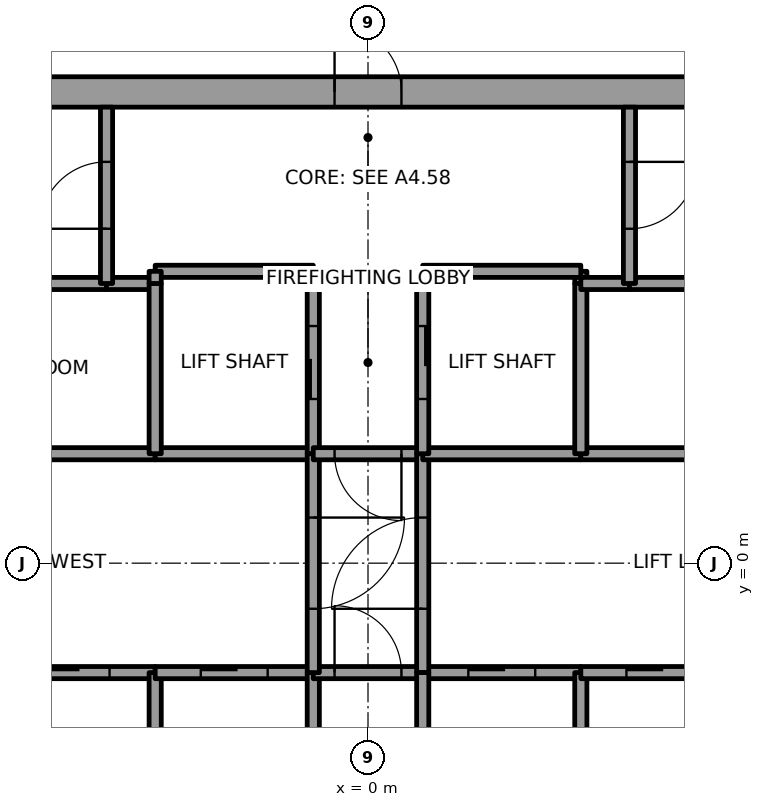
"""IFC4 building model, lengths in metres.
Left out: names, types, materials, properties, quantities, classifications, styles, units other than length and angle.
Written with IfcOpenShell. Run it as: python <this file> out.ifc"""

import sys

from ifc_helpers import new_model, si_unit, direction, frame, frame_2d, origin, place, context, subcontext, project, spatial, rectangle, extrude, element, fill, save


model = new_model("IFC4")
c1 = context("Model", 3, precision=1e-05, world=origin(), true_north=direction((0.0, 1.0)))
c2 = subcontext(c1, "Body", "Model", "MODEL_VIEW")
j1 = project(units=[si_unit("LENGTHUNIT", "METRE"), si_unit("PLANEANGLEUNIT", "RADIAN")], contexts=[c1])
p1 = place(None, origin())
s1 = spatial("IfcSite", under=j1, at=p1, CompositionType="ELEMENT")
p2 = place(p1, origin())
s2 = spatial("IfcBuilding", under=s1, at=p2, CompositionType="ELEMENT")
p3 = place(p2, frame((0.0, 0.0, 251.0)))
s3 = spatial("IfcBuildingStorey", under=s2, at=p3, CompositionType="ELEMENT", Elevation=251.0)
p4 = place(p3, frame((-11.0, 7.75, 0.0), z_axis=(0.0, 0.0, 1.0), x_axis=(1.0, 0.0, 0.0)))
e1 = element("IfcWall", 1, at=p4, inside=s3, PredefinedType="SHEAR", context=c2, shape_type="SweptSolid", body=[
    extrude(rectangle(XDim=22.0, YDim=0.5, at=frame_2d((11.0, 0.0))), origin(), (0.0, 0.0, 1.0), 4.0),
])
p5 = place(p4, frame((10.45, 0.0, 0.0)))
e2 = element("IfcOpeningElement", 2, at=p5, cuts=e1, PredefinedType="OPENING", context=c2, shape_type="SweptSolid", body=[
    extrude(rectangle(XDim=1.1, YDim=2.1, at=frame_2d((0.55, 1.05))), frame((0.0, 0.25, 0.0), z_axis=(0.0, -1.0, 0.0), x_axis=(1.0, 0.0, 0.0)), (0.0, 0.0, 1.0), 0.5),
])
p6 = place(p3, frame((-8.7, 1.8, 0.0), z_axis=(0.0, 0.0, 1.0), x_axis=(1.0, 0.0, 0.0)))
e3 = element("IfcWall", 3, at=p6, inside=s3, PredefinedType="SOLIDWALL", context=c2, shape_type="SweptSolid", body=[
    extrude(rectangle(XDim=5.2, YDim=0.2, at=frame_2d((2.6, 0.0))), origin(), (0.0, 0.0, 1.0), 3.85),
])
p7 = place(p6, frame((2.15, 0.0, 0.0)))
e4 = element("IfcOpeningElement", 4, at=p7, cuts=e3, PredefinedType="OPENING", context=c2, shape_type="SweptSolid", body=[
    extrude(rectangle(XDim=0.9, YDim=2.1, at=frame_2d((0.45, 1.05))), frame((0.0, 0.1, 0.0), z_axis=(0.0, -1.0, 0.0), x_axis=(1.0, 0.0, 0.0)), (0.0, 0.0, 1.0), 0.2),
])
p8 = place(p3, frame((-4.3, 4.6, 0.0), z_axis=(0.0, 0.0, 1.0), x_axis=(-1.0, 0.0, 0.0)))
e5 = element("IfcWall", 5, at=p8, inside=s3, PredefinedType="SOLIDWALL", context=c2, shape_type="SweptSolid", body=[
    extrude(rectangle(XDim=4.4, YDim=0.2, at=frame_2d((2.2, 0.0))), origin(), (0.0, 0.0, 1.0), 3.85),
])
p9 = place(p3, frame((-6.1, -1.8, 0.0), z_axis=(0.0, 0.0, 1.0), x_axis=(1.0, 0.0, 0.0)))
e6 = element("IfcWall", 6, at=p9, inside=s3, PredefinedType="SOLIDWALL", context=c2, shape_type="SweptSolid", body=[
    extrude(rectangle(XDim=2.6, YDim=0.2, at=frame_2d((1.3, 0.0))), origin(), (0.0, 0.0, 1.0), 3.85),
])
p10 = place(p9, frame((0.75, 0.0, 0.0)))
e7 = element("IfcOpeningElement", 7, at=p10, cuts=e6, PredefinedType="OPENING", context=c2, shape_type="SweptSolid", body=[
    extrude(rectangle(XDim=1.1, YDim=2.1, at=frame_2d((0.55, 1.05))), frame((0.0, 0.1, 0.0), z_axis=(0.0, -1.0, 0.0), x_axis=(1.0, 0.0, 0.0)), (0.0, 0.0, 1.0), 0.2),
])
p11 = place(p3, frame((-3.5, 4.6, 0.0), z_axis=(0.0, 0.0, 1.0), x_axis=(-1.0, 0.0, 0.0)))
e8 = element("IfcWall", 8, at=p11, inside=s3, PredefinedType="SOLIDWALL", context=c2, shape_type="SweptSolid", body=[
    extrude(rectangle(XDim=0.8, YDim=0.2, at=frame_2d((0.4, 0.0))), origin(), (0.0, 0.0, 1.0), 3.85),
])
p12 = place(p3, frame((-4.3, 4.6, 0.0), z_axis=(0.0, 0.0, 1.0), x_axis=(0.0, 1.0, 0.0)))
e9 = element("IfcWall", 9, at=p12, inside=s3, PredefinedType="SOLIDWALL", context=c2, shape_type="SweptSolid", body=[
    extrude(rectangle(XDim=2.9, YDim=0.2, at=frame_2d((1.45, 0.0))), origin(), (0.0, 0.0, 1.0), 3.85),
])
p13 = place(p12, frame((0.9, 0.0, 0.0)))
e10 = element("IfcOpeningElement", 10, at=p13, cuts=e9, PredefinedType="OPENING", context=c2, shape_type="SweptSolid", body=[
    extrude(rectangle(XDim=1.1, YDim=2.1, at=frame_2d((0.55, 1.05))), frame((0.0, 0.1, 0.0), z_axis=(0.0, -1.0, 0.0), x_axis=(1.0, 0.0, 0.0)), (0.0, 0.0, 1.0), 0.2),
])
p14 = place(p3, frame((-3.5, -4.6, 0.0), z_axis=(0.0, 0.0, 1.0), x_axis=(0.0, 1.0, 0.0)))
e11 = element("IfcWall", 11, at=p14, inside=s3, PredefinedType="SOLIDWALL", context=c2, shape_type="SweptSolid", body=[
    extrude(rectangle(XDim=2.8, YDim=0.2, at=frame_2d((1.4, 0.0))), origin(), (0.0, 0.0, 1.0), 3.85),
])
p15 = place(p3, frame((-3.5, -1.8, 0.0), z_axis=(0.0, 0.0, 1.0), x_axis=(1.0, 0.0, 0.0)))
e12 = element("IfcWall", 12, at=p15, inside=s3, PredefinedType="SOLIDWALL", context=c2, shape_type="SweptSolid", body=[
    extrude(rectangle(XDim=2.6, YDim=0.2, at=frame_2d((1.3, 0.0))), origin(), (0.0, 0.0, 1.0), 3.85),
])
p16 = place(p15, frame((0.75, 0.0, 0.0)))
e13 = element("IfcOpeningElement", 13, at=p16, cuts=e12, PredefinedType="OPENING", context=c2, shape_type="SweptSolid", body=[
    extrude(rectangle(XDim=1.1, YDim=2.1, at=frame_2d((0.55, 1.05))), frame((0.0, 0.1, 0.0), z_axis=(0.0, -1.0, 0.0), x_axis=(1.0, 0.0, 0.0)), (0.0, 0.0, 1.0), 0.2),
])
p17 = place(p3, frame((-0.9, 1.8, 0.0), z_axis=(0.0, 0.0, 1.0), x_axis=(-1.0, 0.0, 0.0)))
e14 = element("IfcWall", 14, at=p17, inside=s3, PredefinedType="SOLIDWALL", context=c2, shape_type="SweptSolid", body=[
    extrude(rectangle(XDim=2.6, YDim=0.2, at=frame_2d((1.3, 0.0))), origin(), (0.0, 0.0, 1.0), 3.85),
])
p18 = place(p3, frame((-3.5, 1.8, 0.0), z_axis=(0.0, 0.0, 1.0), x_axis=(0.0, 1.0, 0.0)))
e15 = element("IfcWall", 15, at=p18, inside=s3, PredefinedType="SOLIDWALL", context=c2, shape_type="SweptSolid", body=[
    extrude(rectangle(XDim=2.8, YDim=0.2, at=frame_2d((1.4, 0.0))), origin(), (0.0, 0.0, 1.0), 3.85),
])
p19 = place(p3, frame((-0.9, 1.8, 0.0), z_axis=(0.0, 0.0, 1.0), x_axis=(0.0, 1.0, 0.0)))
e16 = element("IfcWall", 16, at=p19, inside=s3, PredefinedType="SOLIDWALL", context=c2, shape_type="SweptSolid", body=[
    extrude(rectangle(XDim=3.0, YDim=0.2, at=frame_2d((1.5, 0.0))), origin(), (0.0, 0.0, 1.0), 3.85),
])
p20 = place(p19, frame((0.9, 0.0, 0.0)))
e17 = element("IfcOpeningElement", 17, at=p20, cuts=e16, PredefinedType="OPENING", context=c2, shape_type="SweptSolid", body=[
    extrude(rectangle(XDim=1.2, YDim=2.1, at=frame_2d((0.6, 1.05))), frame((0.0, 0.1, 0.0), z_axis=(0.0, -1.0, 0.0), x_axis=(1.0, 0.0, 0.0)), (0.0, 0.0, 1.0), 0.2),
])
p21 = place(p3, frame((-0.9, 4.8, 0.0), z_axis=(0.0, 0.0, 1.0), x_axis=(-1.0, 0.0, 0.0)))
e18 = element("IfcWall", 18, at=p21, inside=s3, PredefinedType="SOLIDWALL", context=c2, shape_type="SweptSolid", body=[
    extrude(rectangle(XDim=2.6, YDim=0.2, at=frame_2d((1.3, 0.0))), origin(), (0.0, 0.0, 1.0), 3.85),
])
p22 = place(p3, frame((-3.5, 4.8, 0.0), z_axis=(0.0, 0.0, 1.0), x_axis=(0.0, -1.0, 0.0)))
e19 = element("IfcWall", 19, at=p22, inside=s3, PredefinedType="SOLIDWALL", context=c2, shape_type="SweptSolid", body=[
    extrude(rectangle(XDim=0.2, YDim=0.2, at=frame_2d((0.1, 0.0))), origin(), (0.0, 0.0, 1.0), 3.85),
])
p23 = place(p3, frame((-0.9, -4.6, 0.0), z_axis=(0.0, 0.0, 1.0), x_axis=(0.0, 1.0, 0.0)))
e20 = element("IfcWall", 20, at=p23, inside=s3, PredefinedType="SOLIDWALL", context=c2, shape_type="SweptSolid", body=[
    extrude(rectangle(XDim=2.8, YDim=0.2, at=frame_2d((1.4, 0.0))), origin(), (0.0, 0.0, 1.0), 3.85),
])
p24 = place(p3, frame((-0.9, -1.8, 0.0), z_axis=(0.0, 0.0, 1.0), x_axis=(1.0, 0.0, 0.0)))
e21 = element("IfcWall", 21, at=p24, inside=s3, PredefinedType="SOLIDWALL", context=c2, shape_type="SweptSolid", body=[
    extrude(rectangle(XDim=1.8, YDim=0.2, at=frame_2d((0.9, 0.0))), origin(), (0.0, 0.0, 1.0), 3.85),
])
p25 = place(p24, frame((0.35, 0.0, 0.0)))
e22 = element("IfcOpeningElement", 22, at=p25, cuts=e21, PredefinedType="OPENING", context=c2, shape_type="SweptSolid", body=[
    extrude(rectangle(XDim=1.1, YDim=2.1, at=frame_2d((0.55, 1.05))), frame((0.0, 0.1, 0.0), z_axis=(0.0, -1.0, 0.0), x_axis=(1.0, 0.0, 0.0)), (0.0, 0.0, 1.0), 0.2),
])
p26 = place(p3, frame((-0.9, 1.8, 0.0), z_axis=(0.0, 0.0, 1.0), x_axis=(0.0, -1.0, 0.0)))
e23 = element("IfcWall", 23, at=p26, inside=s3, PredefinedType="SOLIDWALL", context=c2, shape_type="SweptSolid", body=[
    extrude(rectangle(XDim=3.6, YDim=0.2, at=frame_2d((1.8, 0.0))), origin(), (0.0, 0.0, 1.0), 3.85),
])
p27 = place(p26, frame((1.05, 0.0, 0.0)))
e24 = element("IfcOpeningElement", 24, at=p27, cuts=e23, PredefinedType="OPENING", context=c2, shape_type="SweptSolid", body=[
    extrude(rectangle(XDim=1.5, YDim=2.1, at=frame_2d((0.75, 1.05))), frame((0.0, 0.1, 0.0), z_axis=(0.0, -1.0, 0.0), x_axis=(1.0, 0.0, 0.0)), (0.0, 0.0, 1.0), 0.2),
])
p28 = place(p3, frame((0.9, 1.8, 0.0), z_axis=(0.0, 0.0, 1.0), x_axis=(-1.0, 0.0, 0.0)))
e25 = element("IfcWall", 25, at=p28, inside=s3, PredefinedType="SOLIDWALL", context=c2, shape_type="SweptSolid", body=[
    extrude(rectangle(XDim=1.8, YDim=0.2, at=frame_2d((0.9, 0.0))), origin(), (0.0, 0.0, 1.0), 3.85),
])
p29 = place(p28, frame((0.35, 0.0, 0.0)))
e26 = element("IfcOpeningElement", 26, at=p29, cuts=e25, PredefinedType="OPENING", context=c2, shape_type="SweptSolid", body=[
    extrude(rectangle(XDim=1.1, YDim=2.1, at=frame_2d((0.55, 1.05))), frame((0.0, 0.1, 0.0), z_axis=(0.0, -1.0, 0.0), x_axis=(1.0, 0.0, 0.0)), (0.0, 0.0, 1.0), 0.2),
])
p30 = place(p3, frame((0.9, -1.8, 0.0), z_axis=(0.0, 0.0, 1.0), x_axis=(1.0, 0.0, 0.0)))
e27 = element("IfcWall", 27, at=p30, inside=s3, PredefinedType="SOLIDWALL", context=c2, shape_type="SweptSolid", body=[
    extrude(rectangle(XDim=2.6, YDim=0.2, at=frame_2d((1.3, 0.0))), origin(), (0.0, 0.0, 1.0), 3.85),
])
p31 = place(p30, frame((0.75, 0.0, 0.0)))
e28 = element("IfcOpeningElement", 28, at=p31, cuts=e27, PredefinedType="OPENING", context=c2, shape_type="SweptSolid", body=[
    extrude(rectangle(XDim=1.1, YDim=2.1, at=frame_2d((0.55, 1.05))), frame((0.0, 0.1, 0.0), z_axis=(0.0, -1.0, 0.0), x_axis=(1.0, 0.0, 0.0)), (0.0, 0.0, 1.0), 0.2),
])
p32 = place(p3, frame((0.9, -1.8, 0.0), z_axis=(0.0, 0.0, 1.0), x_axis=(0.0, 1.0, 0.0)))
e29 = element("IfcWall", 29, at=p32, inside=s3, PredefinedType="SOLIDWALL", context=c2, shape_type="SweptSolid", body=[
    extrude(rectangle(XDim=3.6, YDim=0.2, at=frame_2d((1.8, 0.0))), origin(), (0.0, 0.0, 1.0), 3.85),
])
p33 = place(p32, frame((1.05, 0.0, 0.0)))
e30 = element("IfcOpeningElement", 30, at=p33, cuts=e29, PredefinedType="OPENING", context=c2, shape_type="SweptSolid", body=[
    extrude(rectangle(XDim=1.5, YDim=2.1, at=frame_2d((0.75, 1.05))), frame((0.0, 0.1, 0.0), z_axis=(0.0, -1.0, 0.0), x_axis=(1.0, 0.0, 0.0)), (0.0, 0.0, 1.0), 0.2),
])
p34 = place(p3, frame((0.9, -1.8, 0.0), z_axis=(0.0, 0.0, 1.0), x_axis=(0.0, -1.0, 0.0)))
e31 = element("IfcWall", 31, at=p34, inside=s3, PredefinedType="SOLIDWALL", context=c2, shape_type="SweptSolid", body=[
    extrude(rectangle(XDim=2.8, YDim=0.2, at=frame_2d((1.4, 0.0))), origin(), (0.0, 0.0, 1.0), 3.85),
])
p35 = place(p3, frame((3.5, 1.8, 0.0), z_axis=(0.0, 0.0, 1.0), x_axis=(-1.0, 0.0, 0.0)))
e32 = element("IfcWall", 32, at=p35, inside=s3, PredefinedType="SOLIDWALL", context=c2, shape_type="SweptSolid", body=[
    extrude(rectangle(XDim=2.6, YDim=0.2, at=frame_2d((1.3, 0.0))), origin(), (0.0, 0.0, 1.0), 3.85),
])
p36 = place(p3, frame((3.5, 4.6, 0.0), z_axis=(0.0, 0.0, 1.0), x_axis=(0.0, 1.0, 0.0)))
e33 = element("IfcWall", 33, at=p36, inside=s3, PredefinedType="SOLIDWALL", context=c2, shape_type="SweptSolid", body=[
    extrude(rectangle(XDim=0.2, YDim=0.2, at=frame_2d((0.1, 0.0))), origin(), (0.0, 0.0, 1.0), 3.85),
])
p37 = place(p3, frame((3.5, 4.8, 0.0), z_axis=(0.0, 0.0, 1.0), x_axis=(-1.0, 0.0, 0.0)))
e34 = element("IfcWall", 34, at=p37, inside=s3, PredefinedType="SOLIDWALL", context=c2, shape_type="SweptSolid", body=[
    extrude(rectangle(XDim=2.6, YDim=0.2, at=frame_2d((1.3, 0.0))), origin(), (0.0, 0.0, 1.0), 3.85),
])
p38 = place(p3, frame((0.9, 4.8, 0.0), z_axis=(0.0, 0.0, 1.0), x_axis=(0.0, -1.0, 0.0)))
e35 = element("IfcWall", 35, at=p38, inside=s3, PredefinedType="SOLIDWALL", context=c2, shape_type="SweptSolid", body=[
    extrude(rectangle(XDim=3.0, YDim=0.2, at=frame_2d((1.5, 0.0))), origin(), (0.0, 0.0, 1.0), 3.85),
])
p39 = place(p38, frame((0.9, 0.0, 0.0)))
e36 = element("IfcOpeningElement", 36, at=p39, cuts=e35, PredefinedType="OPENING", context=c2, shape_type="SweptSolid", body=[
    extrude(rectangle(XDim=1.2, YDim=2.1, at=frame_2d((0.6, 1.05))), frame((0.0, 0.1, 0.0), z_axis=(0.0, -1.0, 0.0), x_axis=(1.0, 0.0, 0.0)), (0.0, 0.0, 1.0), 0.2),
])
p40 = place(p3, frame((3.5, -4.6, 0.0), z_axis=(0.0, 0.0, 1.0), x_axis=(0.0, 1.0, 0.0)))
e37 = element("IfcWall", 37, at=p40, inside=s3, PredefinedType="SOLIDWALL", context=c2, shape_type="SweptSolid", body=[
    extrude(rectangle(XDim=2.8, YDim=0.2, at=frame_2d((1.4, 0.0))), origin(), (0.0, 0.0, 1.0), 3.85),
])
p41 = place(p3, frame((3.5, -1.8, 0.0), z_axis=(0.0, 0.0, 1.0), x_axis=(1.0, 0.0, 0.0)))
e38 = element("IfcWall", 38, at=p41, inside=s3, PredefinedType="SOLIDWALL", context=c2, shape_type="SweptSolid", body=[
    extrude(rectangle(XDim=2.6, YDim=0.2, at=frame_2d((1.3, 0.0))), origin(), (0.0, 0.0, 1.0), 3.85),
])
p42 = place(p41, frame((0.75, 0.0, 0.0)))
e39 = element("IfcOpeningElement", 39, at=p42, cuts=e38, PredefinedType="OPENING", context=c2, shape_type="SweptSolid", body=[
    extrude(rectangle(XDim=1.1, YDim=2.1, at=frame_2d((0.55, 1.05))), frame((0.0, 0.1, 0.0), z_axis=(0.0, -1.0, 0.0), x_axis=(1.0, 0.0, 0.0)), (0.0, 0.0, 1.0), 0.2),
])
p43 = place(p3, frame((3.5, 1.8, 0.0), z_axis=(0.0, 0.0, 1.0), x_axis=(1.0, 0.0, 0.0)))
e40 = element("IfcWall", 40, at=p43, inside=s3, PredefinedType="SOLIDWALL", context=c2, shape_type="SweptSolid", body=[
    extrude(rectangle(XDim=5.2, YDim=0.2, at=frame_2d((2.6, 0.0))), origin(), (0.0, 0.0, 1.0), 3.85),
])
p44 = place(p43, frame((2.15, 0.0, 0.0)))
e41 = element("IfcOpeningElement", 41, at=p44, cuts=e40, PredefinedType="OPENING", context=c2, shape_type="SweptSolid", body=[
    extrude(rectangle(XDim=0.9, YDim=2.1, at=frame_2d((0.45, 1.05))), frame((0.0, 0.1, 0.0), z_axis=(0.0, -1.0, 0.0), x_axis=(1.0, 0.0, 0.0)), (0.0, 0.0, 1.0), 0.2),
])
p45 = place(p3, frame((3.5, 4.6, 0.0), z_axis=(0.0, 0.0, 1.0), x_axis=(0.0, -1.0, 0.0)))
e42 = element("IfcWall", 42, at=p45, inside=s3, PredefinedType="SOLIDWALL", context=c2, shape_type="SweptSolid", body=[
    extrude(rectangle(XDim=2.8, YDim=0.2, at=frame_2d((1.4, 0.0))), origin(), (0.0, 0.0, 1.0), 3.85),
])
p46 = place(p3, frame((4.3, 4.6, 0.0), z_axis=(0.0, 0.0, 1.0), x_axis=(-1.0, 0.0, 0.0)))
e43 = element("IfcWall", 43, at=p46, inside=s3, PredefinedType="SOLIDWALL", context=c2, shape_type="SweptSolid", body=[
    extrude(rectangle(XDim=0.8, YDim=0.2, at=frame_2d((0.4, 0.0))), origin(), (0.0, 0.0, 1.0), 3.85),
])
p47 = place(p3, frame((8.7, 4.6, 0.0), z_axis=(0.0, 0.0, 1.0), x_axis=(-1.0, 0.0, 0.0)))
e44 = element("IfcWall", 44, at=p47, inside=s3, PredefinedType="SOLIDWALL", context=c2, shape_type="SweptSolid", body=[
    extrude(rectangle(XDim=4.4, YDim=0.2, at=frame_2d((2.2, 0.0))), origin(), (0.0, 0.0, 1.0), 3.85),
])
p48 = place(p3, frame((4.3, 7.5, 0.0), z_axis=(0.0, 0.0, 1.0), x_axis=(0.0, -1.0, 0.0)))
e45 = element("IfcWall", 45, at=p48, inside=s3, PredefinedType="SOLIDWALL", context=c2, shape_type="SweptSolid", body=[
    extrude(rectangle(XDim=2.9, YDim=0.2, at=frame_2d((1.45, 0.0))), origin(), (0.0, 0.0, 1.0), 3.85),
])
p49 = place(p48, frame((0.9, 0.0, 0.0)))
e46 = element("IfcOpeningElement", 46, at=p49, cuts=e45, PredefinedType="OPENING", context=c2, shape_type="SweptSolid", body=[
    extrude(rectangle(XDim=1.1, YDim=2.1, at=frame_2d((0.55, 1.05))), frame((0.0, 0.1, 0.0), z_axis=(0.0, -1.0, 0.0), x_axis=(1.0, 0.0, 0.0)), (0.0, 0.0, 1.0), 0.2),
])
p50 = place(p10, origin())
e47 = element("IfcDoor", 47, at=p50, inside=s3, OperationType="SLIDING_TO_LEFT", PredefinedType="DOOR", context=c2, shape_type="SweptSolid", body=[
    extrude(rectangle(XDim=1.1, YDim=2.1, at=frame_2d((0.55, 1.05))), frame((0.0, 0.025, 0.0), z_axis=(0.0, -1.0, 0.0), x_axis=(1.0, 0.0, 0.0)), (0.0, 0.0, 1.0), 0.05),
])
fill(e7, e47)
p51 = place(p16, origin())
e48 = element("IfcDoor", 48, at=p51, inside=s3, OperationType="SLIDING_TO_LEFT", PredefinedType="DOOR", context=c2, shape_type="SweptSolid", body=[
    extrude(rectangle(XDim=1.1, YDim=2.1, at=frame_2d((0.55, 1.05))), frame((0.0, 0.025, 0.0), z_axis=(0.0, -1.0, 0.0), x_axis=(1.0, 0.0, 0.0)), (0.0, 0.0, 1.0), 0.05),
])
fill(e13, e48)
p52 = place(p31, origin())
e49 = element("IfcDoor", 49, at=p52, inside=s3, OperationType="SLIDING_TO_RIGHT", PredefinedType="DOOR", context=c2, shape_type="SweptSolid", body=[
    extrude(rectangle(XDim=1.1, YDim=2.1, at=frame_2d((0.55, 1.05))), frame((0.0, 0.025, 0.0), z_axis=(0.0, -1.0, 0.0), x_axis=(1.0, 0.0, 0.0)), (0.0, 0.0, 1.0), 0.05),
])
fill(e28, e49)
p53 = place(p42, origin())
e50 = element("IfcDoor", 50, at=p53, inside=s3, OperationType="SLIDING_TO_LEFT", PredefinedType="DOOR", context=c2, shape_type="SweptSolid", body=[
    extrude(rectangle(XDim=1.1, YDim=2.1, at=frame_2d((0.55, 1.05))), frame((0.0, 0.025, 0.0), z_axis=(0.0, -1.0, 0.0), x_axis=(1.0, 0.0, 0.0)), (0.0, 0.0, 1.0), 0.05),
])
fill(e39, e50)
p54 = place(p20, origin())
e51 = element("IfcDoor", 51, at=p54, inside=s3, OperationType="SLIDING_TO_RIGHT", PredefinedType="DOOR", context=c2, shape_type="SweptSolid", body=[
    extrude(rectangle(XDim=1.2, YDim=2.1, at=frame_2d((0.6, 1.05))), frame((0.0, 0.025, 0.0), z_axis=(0.0, -1.0, 0.0), x_axis=(1.0, 0.0, 0.0)), (0.0, 0.0, 1.0), 0.05),
])
fill(e17, e51)
p55 = place(p39, origin())
e52 = element("IfcDoor", 52, at=p55, inside=s3, OperationType="SLIDING_TO_RIGHT", PredefinedType="DOOR", context=c2, shape_type="SweptSolid", body=[
    extrude(rectangle(XDim=1.2, YDim=2.1, at=frame_2d((0.6, 1.05))), frame((0.0, 0.025, 0.0), z_axis=(0.0, -1.0, 0.0), x_axis=(1.0, 0.0, 0.0)), (0.0, 0.0, 1.0), 0.05),
])
fill(e36, e52)
p56 = place(p27, origin())
e53 = element("IfcDoor", 53, at=p56, inside=s3, OperationType="DOUBLE_DOOR_SINGLE_SWING", PredefinedType="DOOR", context=c2, shape_type="SweptSolid", body=[
    extrude(rectangle(XDim=1.5, YDim=2.1, at=frame_2d((0.75, 1.05))), frame((0.0, 0.025, 0.0), z_axis=(0.0, -1.0, 0.0), x_axis=(1.0, 0.0, 0.0)), (0.0, 0.0, 1.0), 0.05),
])
fill(e24, e53)
p57 = place(p33, origin())
e54 = element("IfcDoor", 54, at=p57, inside=s3, OperationType="DOUBLE_DOOR_SINGLE_SWING", PredefinedType="DOOR", context=c2, shape_type="SweptSolid", body=[
    extrude(rectangle(XDim=1.5, YDim=2.1, at=frame_2d((0.75, 1.05))), frame((0.0, 0.025, 0.0), z_axis=(0.0, -1.0, 0.0), x_axis=(1.0, 0.0, 0.0)), (0.0, 0.0, 1.0), 0.05),
])
fill(e30, e54)
p58 = place(p29, origin())
e55 = element("IfcDoor", 55, at=p58, inside=s3, OperationType="SINGLE_SWING_LEFT", PredefinedType="DOOR", context=c2, shape_type="SweptSolid", body=[
    extrude(rectangle(XDim=1.1, YDim=2.1, at=frame_2d((0.55, 1.05))), frame((0.0, 0.025, 0.0), z_axis=(0.0, -1.0, 0.0), x_axis=(1.0, 0.0, 0.0)), (0.0, 0.0, 1.0), 0.05),
])
fill(e26, e55)
p59 = place(p25, origin())
e56 = element("IfcDoor", 56, at=p59, inside=s3, OperationType="SINGLE_SWING_LEFT", PredefinedType="DOOR", context=c2, shape_type="SweptSolid", body=[
    extrude(rectangle(XDim=1.1, YDim=2.1, at=frame_2d((0.55, 1.05))), frame((0.0, 0.025, 0.0), z_axis=(0.0, -1.0, 0.0), x_axis=(1.0, 0.0, 0.0)), (0.0, 0.0, 1.0), 0.05),
])
fill(e22, e56)
p60 = place(p13, origin())
e57 = element("IfcDoor", 57, at=p60, inside=s3, OperationType="SINGLE_SWING_RIGHT", PredefinedType="DOOR", context=c2, shape_type="SweptSolid", body=[
    extrude(rectangle(XDim=1.1, YDim=2.1, at=frame_2d((0.55, 1.05))), frame((0.0, 0.025, 0.0), z_axis=(0.0, -1.0, 0.0), x_axis=(1.0, 0.0, 0.0)), (0.0, 0.0, 1.0), 0.05),
])
fill(e10, e57)
p61 = place(p49, origin())
e58 = element("IfcDoor", 58, at=p61, inside=s3, OperationType="SINGLE_SWING_LEFT", PredefinedType="DOOR", context=c2, shape_type="SweptSolid", body=[
    extrude(rectangle(XDim=1.1, YDim=2.1, at=frame_2d((0.55, 1.05))), frame((0.0, 0.025, 0.0), z_axis=(0.0, -1.0, 0.0), x_axis=(1.0, 0.0, 0.0)), (0.0, 0.0, 1.0), 0.05),
])
fill(e46, e58)
p62 = place(p5, origin())
e59 = element("IfcDoor", 59, at=p62, inside=s3, OperationType="SINGLE_SWING_LEFT", PredefinedType="DOOR", context=c2, shape_type="SweptSolid", body=[
    extrude(rectangle(XDim=1.1, YDim=2.1, at=frame_2d((0.55, 1.05))), frame((0.0, 0.025, 0.0), z_axis=(0.0, -1.0, 0.0), x_axis=(1.0, 0.0, 0.0)), (0.0, 0.0, 1.0), 0.05),
])
fill(e2, e59)
save(model, sys.argv[1])
